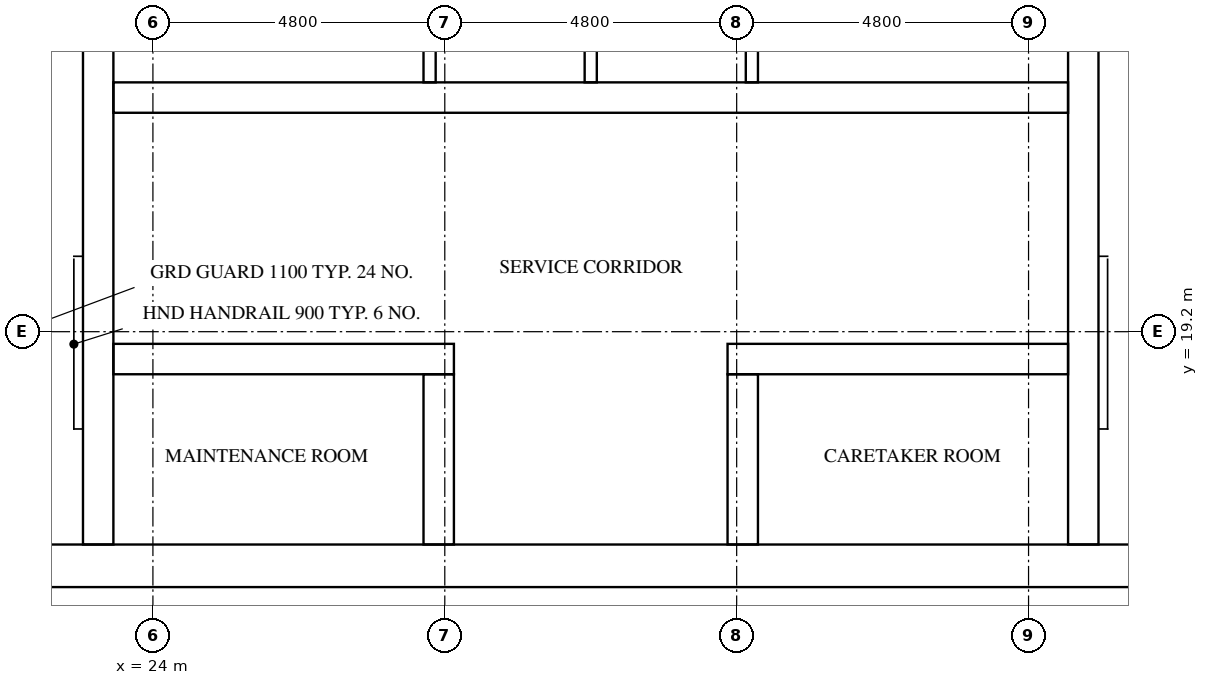
"""IFC4 building model, lengths in metres.
Left out: names, types, materials, properties, quantities, classifications, styles, units other than length and angle.
Written with IfcOpenShell. Run it as: python <this file> out.ifc"""

import sys

from ifc_helpers import new_model, si_unit, direction, frame, frame_2d, origin, place, context, subcontext, project, spatial, rectangle, extrude, element, fill, save


model = new_model("IFC4")
c1 = context("Model", 3, precision=1e-05, world=origin(), true_north=direction((0.0, 1.0)))
c2 = subcontext(c1, "Body", "Model", "MODEL_VIEW")
j1 = project(units=[si_unit("LENGTHUNIT", "METRE"), si_unit("PLANEANGLEUNIT", "RADIAN")], contexts=[c1])
p1 = place(None, origin())
s1 = spatial("IfcSite", under=j1, at=p1, CompositionType="ELEMENT")
p2 = place(p1, origin())
s2 = spatial("IfcBuilding", under=s1, at=p2, CompositionType="ELEMENT")
p3 = place(p2, frame((0.0, 0.0, 208.8)))
s3 = spatial("IfcBuildingStorey", under=s2, at=p3, CompositionType="ELEMENT", Elevation=208.8)
p4 = place(p3, frame((15.0, 15.35, 0.0), z_axis=(0.0, 0.0, 1.0), x_axis=(1.0, 0.0, 0.0)))
e1 = element("IfcWall", 1, at=p4, inside=s3, PredefinedType="SHEAR", context=c2, shape_type="SweptSolid", body=[
    extrude(rectangle(XDim=32.4, YDim=0.7, at=frame_2d((16.2, 0.0))), origin(), (0.0, 0.0, 1.0), 3.2),
])
p5 = place(p4, frame((15.3, 0.0, 0.0)))
e2 = element("IfcOpeningElement", 2, at=p5, cuts=e1, PredefinedType="OPENING", context=c2, shape_type="SweptSolid", body=[
    extrude(rectangle(XDim=1.8, YDim=2.1, at=frame_2d((0.9, 1.05))), frame((0.0, 0.36, 0.0), z_axis=(0.0, -1.0, 0.0), x_axis=(1.0, 0.0, 0.0)), (0.0, 0.0, 1.0), 0.72),
])
p6 = place(p3, frame((23.1, 15.7, 0.0), z_axis=(0.0, 0.0, 1.0), x_axis=(0.0, 1.0, 0.0)))
e3 = element("IfcWall", 3, at=p6, inside=s3, PredefinedType="SHEAR", context=c2, shape_type="SweptSolid", body=[
    extrude(rectangle(XDim=21.4, YDim=0.5, at=frame_2d((10.7, 0.0))), origin(), (0.0, 0.0, 1.0), 3.2),
])
p7 = place(p3, frame((39.3, 15.7, 0.0), z_axis=(0.0, 0.0, 1.0), x_axis=(0.0, 1.0, 0.0)))
e4 = element("IfcWall", 4, at=p7, inside=s3, PredefinedType="SHEAR", context=c2, shape_type="SweptSolid", body=[
    extrude(rectangle(XDim=8.55, YDim=0.5, at=frame_2d((4.275, 0.0))), origin(), (0.0, 0.0, 1.0), 3.2),
])
p8 = place(p3, frame((23.35, 18.75, 0.0), z_axis=(0.0, 0.0, 1.0), x_axis=(1.0, 0.0, 0.0)))
e5 = element("IfcWall", 5, at=p8, inside=s3, PredefinedType="SHEAR", context=c2, shape_type="SweptSolid", body=[
    extrude(rectangle(XDim=5.6, YDim=0.5, at=frame_2d((2.8, 0.0))), origin(), (0.0, 0.0, 1.0), 3.2),
])
p9 = place(p8, frame((2.05, 0.0, 0.0)))
e6 = element("IfcOpeningElement", 6, at=p9, cuts=e5, PredefinedType="OPENING", context=c2, shape_type="SweptSolid", body=[
    extrude(rectangle(XDim=1.0, YDim=2.1, at=frame_2d((0.5, 1.05))), frame((0.0, 0.26, 0.0), z_axis=(0.0, -1.0, 0.0), x_axis=(1.0, 0.0, 0.0)), (0.0, 0.0, 1.0), 0.52),
])
p10 = place(p3, frame((33.45, 18.75, 0.0), z_axis=(0.0, 0.0, 1.0), x_axis=(1.0, 0.0, 0.0)))
e7 = element("IfcWall", 7, at=p10, inside=s3, PredefinedType="SHEAR", context=c2, shape_type="SweptSolid", body=[
    extrude(rectangle(XDim=5.6, YDim=0.5, at=frame_2d((2.8, 0.0))), origin(), (0.0, 0.0, 1.0), 3.2),
])
p11 = place(p10, frame((2.55, 0.0, 0.0)))
e8 = element("IfcOpeningElement", 8, at=p11, cuts=e7, PredefinedType="OPENING", context=c2, shape_type="SweptSolid", body=[
    extrude(rectangle(XDim=1.0, YDim=2.1, at=frame_2d((0.5, 1.05))), frame((0.0, 0.26, 0.0), z_axis=(0.0, -1.0, 0.0), x_axis=(1.0, 0.0, 0.0)), (0.0, 0.0, 1.0), 0.52),
])
p12 = place(p3, frame((23.35, 23.05, 0.0), z_axis=(0.0, 0.0, 1.0), x_axis=(1.0, 0.0, 0.0)))
e9 = element("IfcWall", 9, at=p12, inside=s3, PredefinedType="SHEAR", context=c2, shape_type="SweptSolid", body=[
    extrude(rectangle(XDim=15.7, YDim=0.5, at=frame_2d((7.85, 0.0))), origin(), (0.0, 0.0, 1.0), 3.2),
])
p13 = place(p12, frame((2.05, 0.0, 0.0)))
e10 = element("IfcOpeningElement", 10, at=p13, cuts=e9, PredefinedType="OPENING", context=c2, shape_type="SweptSolid", body=[
    extrude(rectangle(XDim=1.0, YDim=2.1, at=frame_2d((0.5, 1.05))), frame((0.0, 0.26, 0.0), z_axis=(0.0, -1.0, 0.0), x_axis=(1.0, 0.0, 0.0)), (0.0, 0.0, 1.0), 0.52),
])
p14 = place(p12, frame((12.65, 0.0, 0.0)))
e11 = element("IfcOpeningElement", 11, at=p14, cuts=e9, PredefinedType="OPENING", context=c2, shape_type="SweptSolid", body=[
    extrude(rectangle(XDim=1.0, YDim=2.1, at=frame_2d((0.5, 1.05))), frame((0.0, 0.26, 0.0), z_axis=(0.0, -1.0, 0.0), x_axis=(1.0, 0.0, 0.0)), (0.0, 0.0, 1.0), 0.52),
])
for number, where, z_axis, x_axis in (
    (12, (28.7, 15.7, 0.0), (0.0, 0.0, 1.0), (0.0, 1.0, 0.0)),
    (13, (33.7, 15.7, 0.0), (0.0, 0.0, 1.0), (0.0, 1.0, 0.0)),
):
    element("IfcWall", number, at=place(p3, frame(where, z_axis=z_axis, x_axis=x_axis)), inside=s3, PredefinedType="SHEAR", context=c2, shape_type="SweptSolid", body=[
        extrude(rectangle(XDim=2.8, YDim=0.5, at=frame_2d((1.4, 0.0))), origin(), (0.0, 0.0, 1.0), 3.2),
    ])
for number, where, z_axis, x_axis in (
    (14, (28.55, 23.3, 0.0), (0.0, 0.0, 1.0), (0.0, 1.0, 0.0)),
    (15, (31.2, 23.3, 0.0), (0.0, 0.0, 1.0), (0.0, 1.0, 0.0)),
    (16, (33.85, 23.3, 0.0), (0.0, 0.0, 1.0), (0.0, 1.0, 0.0)),
):
    element("IfcWall", number, at=place(p3, frame(where, z_axis=z_axis, x_axis=x_axis)), inside=s3, PredefinedType="SOLIDWALL", context=c2, shape_type="SweptSolid", body=[
        extrude(rectangle(XDim=2.6, YDim=0.2, at=frame_2d((1.3, 0.0))), origin(), (0.0, 0.0, 1.0), 3.2),
    ])
p15 = place(p5, frame((1.8, 0.0, 0.0), z_axis=(0.0, 0.0, 1.0), x_axis=(-1.0, 0.0, 0.0)))
e17 = element("IfcDoor", 17, at=p15, inside=s3, OperationType="DOUBLE_DOOR_SINGLE_SWING", PredefinedType="DOOR", context=c2, shape_type="SweptSolid", body=[
    extrude(rectangle(XDim=1.8, YDim=2.1, at=frame_2d((0.9, 1.05))), frame((0.0, 0.025, 0.0), z_axis=(0.0, -1.0, 0.0), x_axis=(1.0, 0.0, 0.0)), (0.0, 0.0, 1.0), 0.05),
])
fill(e2, e17)
p16 = place(p13, frame((1.0, 0.0, 0.0), z_axis=(0.0, 0.0, 1.0), x_axis=(-1.0, 0.0, 0.0)))
e18 = element("IfcDoor", 18, at=p16, inside=s3, OperationType="SINGLE_SWING_LEFT", PredefinedType="DOOR", context=c2, shape_type="SweptSolid", body=[
    extrude(rectangle(XDim=1.0, YDim=2.1, at=frame_2d((0.5, 1.05))), frame((0.0, 0.025, 0.0), z_axis=(0.0, -1.0, 0.0), x_axis=(1.0, 0.0, 0.0)), (0.0, 0.0, 1.0), 0.05),
])
fill(e10, e18)
p17 = place(p14, frame((1.0, 0.0, 0.0), z_axis=(0.0, 0.0, 1.0), x_axis=(-1.0, 0.0, 0.0)))
e19 = element("IfcDoor", 19, at=p17, inside=s3, OperationType="SINGLE_SWING_RIGHT", PredefinedType="DOOR", context=c2, shape_type="SweptSolid", body=[
    extrude(rectangle(XDim=1.0, YDim=2.1, at=frame_2d((0.5, 1.05))), frame((0.0, 0.025, 0.0), z_axis=(0.0, -1.0, 0.0), x_axis=(1.0, 0.0, 0.0)), (0.0, 0.0, 1.0), 0.05),
])
fill(e11, e19)
p18 = place(p9, origin())
e20 = element("IfcDoor", 20, at=p18, inside=s3, OperationType="SINGLE_SWING_LEFT", PredefinedType="DOOR", context=c2, shape_type="SweptSolid", body=[
    extrude(rectangle(XDim=1.0, YDim=2.1, at=frame_2d((0.5, 1.05))), frame((0.0, 0.025, 0.0), z_axis=(0.0, -1.0, 0.0), x_axis=(1.0, 0.0, 0.0)), (0.0, 0.0, 1.0), 0.05),
])
fill(e6, e20)
p19 = place(p11, origin())
e21 = element("IfcDoor", 21, at=p19, inside=s3, OperationType="SINGLE_SWING_RIGHT", PredefinedType="DOOR", context=c2, shape_type="SweptSolid", body=[
    extrude(rectangle(XDim=1.0, YDim=2.1, at=frame_2d((0.5, 1.05))), frame((0.0, 0.025, 0.0), z_axis=(0.0, -1.0, 0.0), x_axis=(1.0, 0.0, 0.0)), (0.0, 0.0, 1.0), 0.05),
])
fill(e8, e21)
save(model, sys.argv[1])
